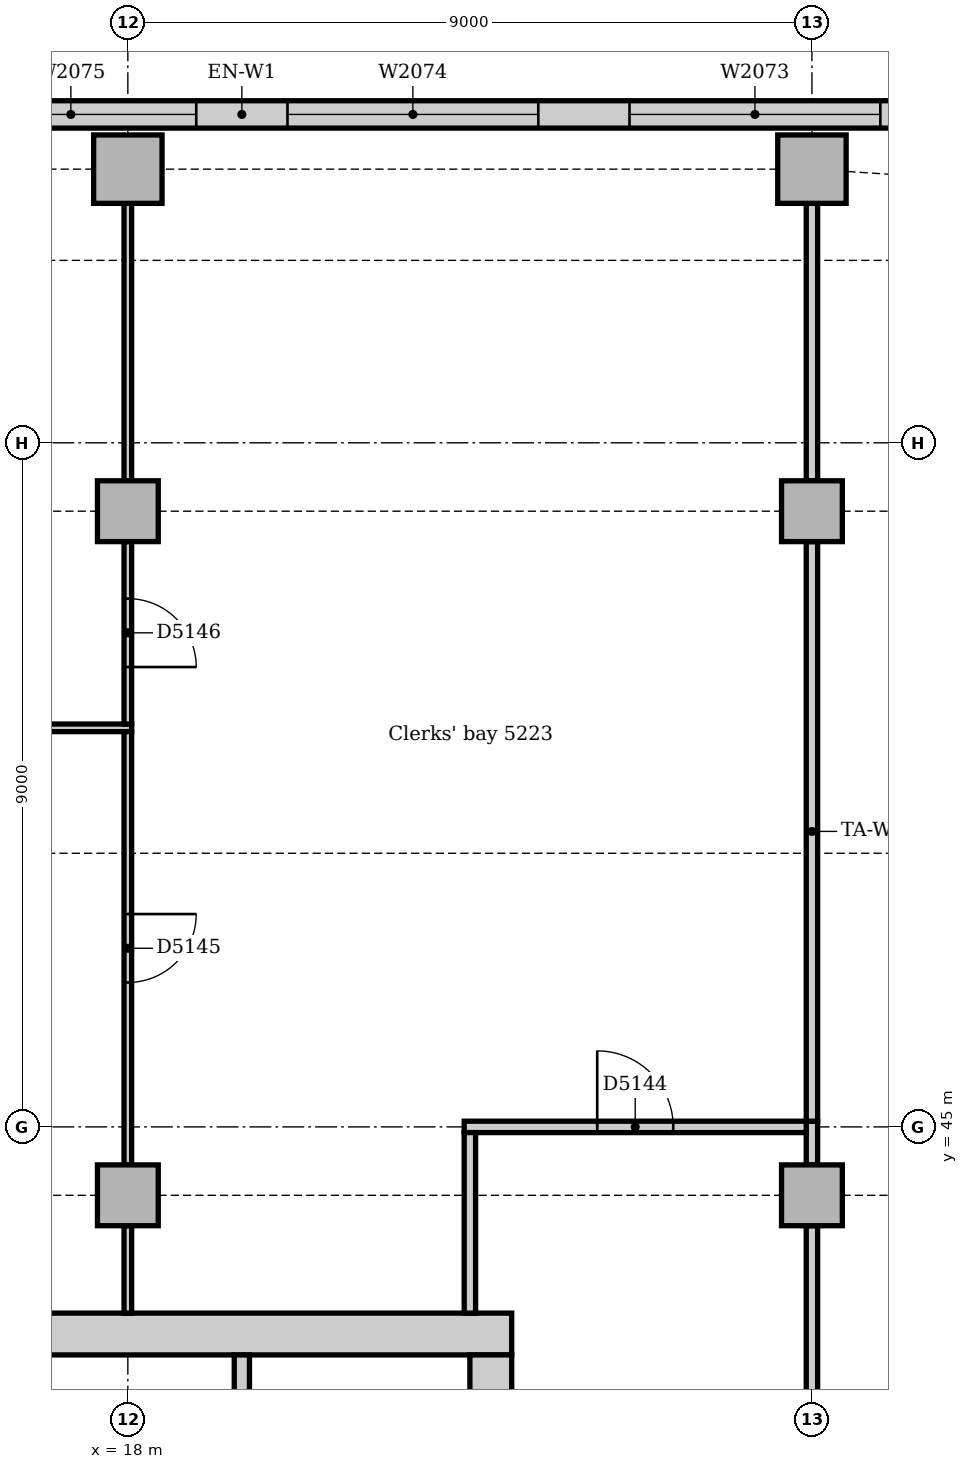
"""IFC4 building model, lengths in metres.
Left out: names, types, materials, properties, quantities, classifications, styles, units other than length and angle.
Written with IfcOpenShell. Run it as: python <this file> out.ifc"""

import sys

from ifc_helpers import new_model, si_unit, direction, frame, frame_2d, origin, origin_2d, place, context, subcontext, project, spatial, rectangle, extrude, element, fill, save


model = new_model("IFC4")
c1 = context("Model", 3, precision=1e-05, world=origin(), true_north=direction((0.0, 1.0)))
c2 = subcontext(c1, "Body", "Model", "MODEL_VIEW")
j1 = project(units=[si_unit("LENGTHUNIT", "METRE"), si_unit("PLANEANGLEUNIT", "RADIAN")], contexts=[c1])
p1 = place(None, origin())
s1 = spatial("IfcSite", under=j1, at=p1, CompositionType="ELEMENT")
p2 = place(p1, origin())
s2 = spatial("IfcBuilding", under=s1, at=p2, CompositionType="ELEMENT")
p3 = place(p2, frame((0.0, 0.0, 218.0)))
s3 = spatial("IfcBuildingStorey", under=s2, at=p3, CompositionType="ELEMENT", Elevation=218.0)
p4 = place(p3, frame((23.05, 42.275, 0.0), z_axis=(0.0, 0.0, 1.0), x_axis=(-1.0, 0.0, 0.0)))
e1 = element("IfcWall", 1, at=p4, inside=s3, PredefinedType="SOLIDWALL", context=c2, shape_type="SweptSolid", body=[
    extrude(rectangle(XDim=19.1, YDim=0.55, at=frame_2d((9.55, 0.0))), origin(), (0.0, 0.0, 1.0), 4.0),
])
p5 = place(p3, frame((22.775, 31.5, 0.0), z_axis=(0.0, 0.0, 1.0), x_axis=(0.0, 1.0, 0.0)))
e2 = element("IfcWall", 2, at=p5, inside=s3, PredefinedType="SOLIDWALL", context=c2, shape_type="SweptSolid", body=[
    extrude(rectangle(XDim=10.5, YDim=0.55, at=frame_2d((5.25, 0.0))), origin(), (0.0, 0.0, 1.0), 4.0),
])
p6 = place(p5, frame((3.15, 0.0, 0.0)))
e3 = element("IfcOpeningElement", 3, at=p6, cuts=e2, PredefinedType="OPENING", context=c2, shape_type="SweptSolid", body=[
    extrude(rectangle(XDim=1.0, YDim=2.1, at=frame_2d((0.5, 1.05))), frame((0.0, 0.285, 0.0), z_axis=(0.0, -1.0, 0.0), x_axis=(1.0, 0.0, 0.0)), (0.0, 0.0, 1.0), 0.57),
])
p7 = place(p5, frame((5.2, 0.0, 0.0)))
e4 = element("IfcOpeningElement", 4, at=p7, cuts=e2, PredefinedType="OPENING", context=c2, shape_type="SweptSolid", body=[
    extrude(rectangle(XDim=1.0, YDim=2.1, at=frame_2d((0.5, 1.05))), frame((0.0, 0.285, 0.0), z_axis=(0.0, -1.0, 0.0), x_axis=(1.0, 0.0, 0.0)), (0.0, 0.0, 1.0), 0.57),
])
for number, where, z_axis, x_axis in (
    (5, (18.0, 57.6, 0.0), (0.0, 0.0, 1.0), (1.0, 0.0, 0.0)),
    (6, (27.0, 57.6, 0.0), (0.0, 0.0, 1.0), (1.0, 0.0, 0.0)),
):
    element("IfcColumn", number, at=place(p3, frame(where, z_axis=z_axis, x_axis=x_axis)), inside=s3, PredefinedType="COLUMN", context=c2, shape_type="SweptSolid", body=[
        extrude(rectangle(XDim=0.9, YDim=0.9, at=origin_2d()), origin(), (0.0, 0.0, 1.0), 3.85),
    ])
for number, where, z_axis, x_axis in (
    (7, (18.0, 44.1, 0.0), (0.0, 0.0, 1.0), (1.0, 0.0, 0.0)),
    (8, (18.0, 53.1, 0.0), (0.0, 0.0, 1.0), (1.0, 0.0, 0.0)),
    (9, (27.0, 44.1, 0.0), (0.0, 0.0, 1.0), (1.0, 0.0, 0.0)),
    (10, (27.0, 53.1, 0.0), (0.0, 0.0, 1.0), (1.0, 0.0, 0.0)),
):
    element("IfcColumn", number, at=place(p3, frame(where, z_axis=z_axis, x_axis=x_axis)), inside=s3, PredefinedType="COLUMN", context=c2, shape_type="SweptSolid", body=[
        extrude(rectangle(XDim=0.8, YDim=0.8, at=origin_2d()), origin(), (0.0, 0.0, 1.0), 3.85),
    ])
p8 = place(p3, frame((34.757, 58.32, 0.0), z_axis=(0.0, 0.0, 1.0), x_axis=(-1.0, 0.0, 0.0)))
e11 = element("IfcWall", 11, at=p8, inside=s3, PredefinedType="STANDARD", context=c2, shape_type="SweptSolid", body=[
    extrude(rectangle(XDim=30.515, YDim=0.36, at=frame_2d((15.257, 0.0))), origin(), (0.0, 0.0, 1.0), 3.85),
])
p9 = place(p8, frame((2.357, 0.0, 0.9)))
e12 = element("IfcOpeningElement", 12, at=p9, cuts=e11, PredefinedType="OPENING", context=c2, shape_type="SweptSolid", body=[
    extrude(rectangle(XDim=3.3, YDim=1.6, at=frame_2d((1.65, 0.8))), frame((0.0, 0.19, 0.0), z_axis=(0.0, -1.0, 0.0), x_axis=(1.0, 0.0, 0.0)), (0.0, 0.0, 1.0), 0.38),
])
p10 = place(p8, frame((6.857, 0.0, 0.9)))
e13 = element("IfcOpeningElement", 13, at=p10, cuts=e11, PredefinedType="OPENING", context=c2, shape_type="SweptSolid", body=[
    extrude(rectangle(XDim=3.3, YDim=1.6, at=frame_2d((1.65, 0.8))), frame((0.0, 0.19, 0.0), z_axis=(0.0, -1.0, 0.0), x_axis=(1.0, 0.0, 0.0)), (0.0, 0.0, 1.0), 0.38),
])
p11 = place(p8, frame((11.357, 0.0, 0.9)))
e14 = element("IfcOpeningElement", 14, at=p11, cuts=e11, PredefinedType="OPENING", context=c2, shape_type="SweptSolid", body=[
    extrude(rectangle(XDim=3.3, YDim=1.6, at=frame_2d((1.65, 0.8))), frame((0.0, 0.19, 0.0), z_axis=(0.0, -1.0, 0.0), x_axis=(1.0, 0.0, 0.0)), (0.0, 0.0, 1.0), 0.38),
])
p12 = place(p8, frame((15.857, 0.0, 0.9)))
e15 = element("IfcOpeningElement", 15, at=p12, cuts=e11, PredefinedType="OPENING", context=c2, shape_type="SweptSolid", body=[
    extrude(rectangle(XDim=3.3, YDim=1.6, at=frame_2d((1.65, 0.8))), frame((0.0, 0.19, 0.0), z_axis=(0.0, -1.0, 0.0), x_axis=(1.0, 0.0, 0.0)), (0.0, 0.0, 1.0), 0.38),
])
p13 = place(p8, frame((20.357, 0.0, 0.9)))
e16 = element("IfcOpeningElement", 16, at=p13, cuts=e11, PredefinedType="OPENING", context=c2, shape_type="SweptSolid", body=[
    extrude(rectangle(XDim=3.3, YDim=1.6, at=frame_2d((1.65, 0.8))), frame((0.0, 0.19, 0.0), z_axis=(0.0, -1.0, 0.0), x_axis=(1.0, 0.0, 0.0)), (0.0, 0.0, 1.0), 0.38),
])
p14 = place(p8, frame((24.857, 0.0, 0.9)))
e17 = element("IfcOpeningElement", 17, at=p14, cuts=e11, PredefinedType="OPENING", context=c2, shape_type="SweptSolid", body=[
    extrude(rectangle(XDim=3.3, YDim=1.6, at=frame_2d((1.65, 0.8))), frame((0.0, 0.19, 0.0), z_axis=(0.0, -1.0, 0.0), x_axis=(1.0, 0.0, 0.0)), (0.0, 0.0, 1.0), 0.38),
])
p15 = place(p3, frame((19.5, 38.6, 0.0), z_axis=(0.0, 0.0, 1.0), x_axis=(0.0, 1.0, 0.0)))
e18 = element("IfcWall", 18, at=p15, inside=s3, PredefinedType="PARTITIONING", context=c2, shape_type="SweptSolid", body=[
    extrude(rectangle(XDim=3.4, YDim=0.2, at=frame_2d((1.7, 0.0))), origin(), (0.0, 0.0, 1.0), 3.85),
])
p16 = place(p3, frame((27.0, 36.4, 0.0), z_axis=(0.0, 0.0, 1.0), x_axis=(0.0, 1.0, 0.0)))
e19 = element("IfcWall", 19, at=p16, inside=s3, PredefinedType="PARTITIONING", context=c2, shape_type="SweptSolid", body=[
    extrude(rectangle(XDim=7.3, YDim=0.15, at=frame_2d((3.65, 0.0))), origin(), (0.0, 0.0, 1.0), 3.35),
])
p17 = place(p3, frame((27.0, 44.5, 0.0), z_axis=(0.0, 0.0, 1.0), x_axis=(0.0, 1.0, 0.0)))
e20 = element("IfcWall", 20, at=p17, inside=s3, PredefinedType="PARTITIONING", context=c2, shape_type="SweptSolid", body=[
    extrude(rectangle(XDim=0.575, YDim=0.15, at=frame_2d((0.287, 0.0))), origin(), (0.0, 0.0, 1.0), 3.35),
])
p18 = place(p3, frame((22.425, 45.0, 0.0), z_axis=(0.0, 0.0, 1.0), x_axis=(1.0, 0.0, 0.0)))
e21 = element("IfcWall", 21, at=p18, inside=s3, PredefinedType="PARTITIONING", context=c2, shape_type="SweptSolid", body=[
    extrude(rectangle(XDim=4.5, YDim=0.15, at=frame_2d((2.25, 0.0))), origin(), (0.0, 0.0, 1.0), 3.85),
])
p19 = place(p18, frame((1.75, 0.0, 0.0)))
e22 = element("IfcOpeningElement", 22, at=p19, cuts=e21, PredefinedType="OPENING", context=c2, shape_type="SweptSolid", body=[
    extrude(rectangle(XDim=1.0, YDim=2.1, at=frame_2d((0.5, 1.05))), frame((0.0, 0.085, 0.0), z_axis=(0.0, -1.0, 0.0), x_axis=(1.0, 0.0, 0.0)), (0.0, 0.0, 1.0), 0.17),
])
p20 = place(p3, frame((22.5, 42.55, 0.0), z_axis=(0.0, 0.0, 1.0), x_axis=(0.0, 1.0, 0.0)))
e23 = element("IfcWall", 23, at=p20, inside=s3, PredefinedType="PARTITIONING", context=c2, shape_type="SweptSolid", body=[
    extrude(rectangle(XDim=2.375, YDim=0.15, at=frame_2d((1.188, 0.0))), origin(), (0.0, 0.0, 1.0), 3.85),
])
p21 = place(p3, frame((27.0, 45.075, 0.0), z_axis=(0.0, 0.0, 1.0), x_axis=(0.0, 1.0, 0.0)))
e24 = element("IfcWall", 24, at=p21, inside=s3, PredefinedType="PARTITIONING", context=c2, shape_type="SweptSolid", body=[
    extrude(rectangle(XDim=7.625, YDim=0.15, at=frame_2d((3.812, 0.0))), origin(), (0.0, 0.0, 1.0), 3.35),
])
p22 = place(p3, frame((27.0, 53.5, 0.0), z_axis=(0.0, 0.0, 1.0), x_axis=(0.0, 1.0, 0.0)))
e25 = element("IfcWall", 25, at=p22, inside=s3, PredefinedType="PARTITIONING", context=c2, shape_type="SweptSolid", body=[
    extrude(rectangle(XDim=3.65, YDim=0.15, at=frame_2d((1.825, 0.0))), origin(), (0.0, 0.0, 1.0), 3.41),
])
p23 = place(p3, frame((0.36, 50.25, 0.0), z_axis=(0.0, 0.0, 1.0), x_axis=(1.0, 0.0, 0.0)))
e26 = element("IfcWall", 26, at=p23, inside=s3, PredefinedType="PARTITIONING", context=c2, shape_type="SweptSolid", body=[
    extrude(rectangle(XDim=17.69, YDim=0.1, at=frame_2d((8.845, 0.0))), origin(), (0.0, 0.0, 1.0), 3.85),
])
p24 = place(p3, frame((18.0, 42.55, 0.0), z_axis=(0.0, 0.0, 1.0), x_axis=(0.0, 1.0, 0.0)))
e27 = element("IfcWall", 27, at=p24, inside=s3, PredefinedType="PARTITIONING", context=c2, shape_type="SweptSolid", body=[
    extrude(rectangle(XDim=1.15, YDim=0.1, at=frame_2d((0.575, 0.0))), origin(), (0.0, 0.0, 1.0), 3.652),
])
p25 = place(p3, frame((18.0, 50.3, 0.0), z_axis=(0.0, 0.0, 1.0), x_axis=(0.0, 1.0, 0.0)))
e28 = element("IfcWall", 28, at=p25, inside=s3, PredefinedType="PARTITIONING", context=c2, shape_type="SweptSolid", body=[
    extrude(rectangle(XDim=2.4, YDim=0.1, at=frame_2d((1.2, 0.0))), origin(), (0.0, 0.0, 1.0), 3.35),
])
p26 = place(p25, frame((0.75, 0.0, 0.0)))
e29 = element("IfcOpeningElement", 29, at=p26, cuts=e28, PredefinedType="OPENING", context=c2, shape_type="SweptSolid", body=[
    extrude(rectangle(XDim=0.9, YDim=2.1, at=frame_2d((0.45, 1.05))), frame((0.0, 0.06, 0.0), z_axis=(0.0, -1.0, 0.0), x_axis=(1.0, 0.0, 0.0)), (0.0, 0.0, 1.0), 0.12),
])
p27 = place(p3, frame((18.0, 44.5, 0.0), z_axis=(0.0, 0.0, 1.0), x_axis=(0.0, 1.0, 0.0)))
e30 = element("IfcWall", 30, at=p27, inside=s3, PredefinedType="PARTITIONING", context=c2, shape_type="SweptSolid", body=[
    extrude(rectangle(XDim=5.7, YDim=0.1, at=frame_2d((2.85, 0.0))), origin(), (0.0, 0.0, 1.0), 3.35),
])
p28 = place(p27, frame((2.4, 0.0, 0.0)))
e31 = element("IfcOpeningElement", 31, at=p28, cuts=e30, PredefinedType="OPENING", context=c2, shape_type="SweptSolid", body=[
    extrude(rectangle(XDim=0.9, YDim=2.1, at=frame_2d((0.45, 1.05))), frame((0.0, 0.06, 0.0), z_axis=(0.0, -1.0, 0.0), x_axis=(1.0, 0.0, 0.0)), (0.0, 0.0, 1.0), 0.12),
])
p29 = place(p3, frame((18.0, 53.5, 0.0), z_axis=(0.0, 0.0, 1.0), x_axis=(0.0, 1.0, 0.0)))
e32 = element("IfcWall", 32, at=p29, inside=s3, PredefinedType="PARTITIONING", context=c2, shape_type="SweptSolid", body=[
    extrude(rectangle(XDim=3.65, YDim=0.1, at=frame_2d((1.825, 0.0))), origin(), (0.0, 0.0, 1.0), 3.41),
])
p30 = place(p10, origin())
e33 = element("IfcWindow", 33, at=p30, inside=s3, PartitioningType="SINGLE_PANEL", PredefinedType="WINDOW", context=c2, shape_type="SweptSolid", body=[
    extrude(rectangle(XDim=3.3, YDim=1.6, at=frame_2d((1.65, 0.8))), frame((0.0, 0.13, 0.0), z_axis=(0.0, -1.0, 0.0), x_axis=(1.0, 0.0, 0.0)), (0.0, 0.0, 1.0), 0.06),
])
fill(e13, e33)
p31 = place(p11, origin())
e34 = element("IfcWindow", 34, at=p31, inside=s3, PartitioningType="SINGLE_PANEL", PredefinedType="WINDOW", context=c2, shape_type="SweptSolid", body=[
    extrude(rectangle(XDim=3.3, YDim=1.6, at=frame_2d((1.65, 0.8))), frame((0.0, 0.13, 0.0), z_axis=(0.0, -1.0, 0.0), x_axis=(1.0, 0.0, 0.0)), (0.0, 0.0, 1.0), 0.06),
])
fill(e14, e34)
p32 = place(p12, origin())
e35 = element("IfcWindow", 35, at=p32, inside=s3, PartitioningType="SINGLE_PANEL", PredefinedType="WINDOW", context=c2, shape_type="SweptSolid", body=[
    extrude(rectangle(XDim=3.3, YDim=1.6, at=frame_2d((1.65, 0.8))), frame((0.0, 0.13, 0.0), z_axis=(0.0, -1.0, 0.0), x_axis=(1.0, 0.0, 0.0)), (0.0, 0.0, 1.0), 0.06),
])
fill(e15, e35)
p33 = place(p19, origin())
e36 = element("IfcDoor", 36, at=p33, inside=s3, OperationType="SINGLE_SWING_LEFT", PredefinedType="DOOR", context=c2, shape_type="SweptSolid", body=[
    extrude(rectangle(XDim=1.0, YDim=2.1, at=frame_2d((0.5, 1.05))), frame((0.0, 0.025, 0.0), z_axis=(0.0, -1.0, 0.0), x_axis=(1.0, 0.0, 0.0)), (0.0, 0.0, 1.0), 0.05),
])
fill(e22, e36)
p34 = place(p28, frame((0.9, 0.0, 0.0), z_axis=(0.0, 0.0, 1.0), x_axis=(-1.0, 0.0, 0.0)))
e37 = element("IfcDoor", 37, at=p34, inside=s3, OperationType="SINGLE_SWING_LEFT", PredefinedType="DOOR", context=c2, shape_type="SweptSolid", body=[
    extrude(rectangle(XDim=0.9, YDim=2.1, at=frame_2d((0.45, 1.05))), frame((0.0, 0.025, 0.0), z_axis=(0.0, -1.0, 0.0), x_axis=(1.0, 0.0, 0.0)), (0.0, 0.0, 1.0), 0.05),
])
fill(e31, e37)
p35 = place(p26, frame((0.9, 0.0, 0.0), z_axis=(0.0, 0.0, 1.0), x_axis=(-1.0, 0.0, 0.0)))
e38 = element("IfcDoor", 38, at=p35, inside=s3, OperationType="SINGLE_SWING_RIGHT", PredefinedType="DOOR", context=c2, shape_type="SweptSolid", body=[
    extrude(rectangle(XDim=0.9, YDim=2.1, at=frame_2d((0.45, 1.05))), frame((0.0, 0.025, 0.0), z_axis=(0.0, -1.0, 0.0), x_axis=(1.0, 0.0, 0.0)), (0.0, 0.0, 1.0), 0.05),
])
fill(e29, e38)
save(model, sys.argv[1])
